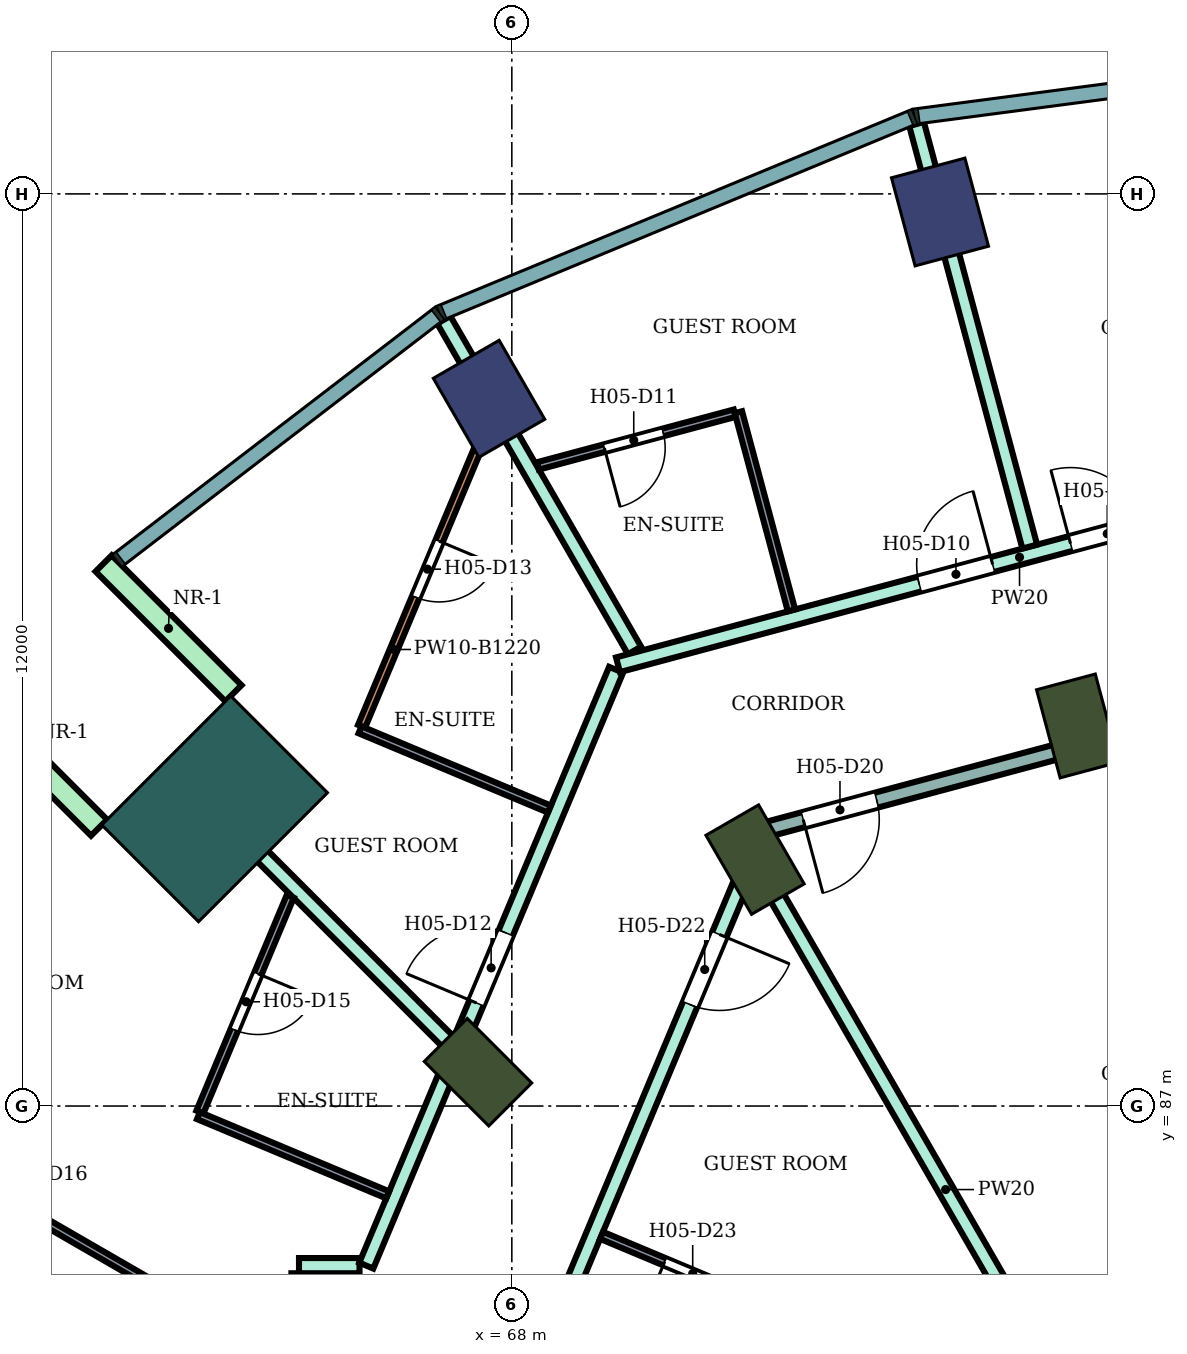
"""IFC4 building model, lengths in metres.
Left out: names, types, materials, properties, quantities, classifications, styles, units other than length and angle.
Written with IfcOpenShell. Run it as: python <this file> out.ifc"""

import sys

from ifc_helpers import new_model, si_unit, direction, frame, frame_2d, origin, origin_2d, place, context, subcontext, project, spatial, rectangle, extrude, element, fill, save


model = new_model("IFC4")
c1 = context("Model", 3, precision=1e-05, world=origin(), true_north=direction((0.0, 1.0)))
c2 = subcontext(c1, "Body", "Model", "MODEL_VIEW")
j1 = project(units=[si_unit("LENGTHUNIT", "METRE"), si_unit("PLANEANGLEUNIT", "RADIAN")], contexts=[c1])
p1 = place(None, origin())
s1 = spatial("IfcSite", under=j1, at=p1, CompositionType="ELEMENT")
p2 = place(p1, origin())
s2 = spatial("IfcBuilding", under=s1, at=p2, CompositionType="ELEMENT")
p3 = place(p2, frame((0.0, 0.0, 82.4)))
s3 = spatial("IfcBuildingStorey", under=s2, at=p3, CompositionType="ELEMENT", Elevation=82.4)
for number, where, z_axis, x_axis in (
    (1, (73.633, 98.762, 0.0), (0.0, 0.0, 1.0), (-0.259, 0.966, 0.0)),
    (2, (67.7, 96.304, 0.0), (0.0, 0.0, 1.0), (-0.5, 0.866, 0.0)),
):
    element("IfcColumn", number, at=place(p3, frame(where, z_axis=z_axis, x_axis=x_axis)), inside=s3, PredefinedType="COLUMN", context=c2, shape_type="SweptSolid", body=[
        extrude(rectangle(XDim=1.2, YDim=1.0, at=origin_2d()), origin(), (0.0, 0.0, 1.0), 3.8),
    ])
for number, where, z_axis, x_axis in (
    (3, (75.445, 92.0, 0.0), (0.0, 0.0, 1.0), (-0.259, 0.966, 0.0)),
    (4, (71.2, 90.242, 0.0), (0.0, 0.0, 1.0), (-0.5, 0.866, 0.0)),
    (5, (67.555, 87.445, 0.0), (0.0, 0.0, 1.0), (-0.707, 0.707, 0.0)),
):
    element("IfcColumn", number, at=place(p3, frame(where, z_axis=z_axis, x_axis=x_axis)), inside=s3, PredefinedType="COLUMN", context=c2, shape_type="SweptSolid", body=[
        extrude(rectangle(XDim=1.2, YDim=0.8, at=origin_2d()), origin(), (0.0, 0.0, 1.0), 3.8),
    ])
p4 = place(p3, frame((64.09, 90.91, 0.0), z_axis=(0.0, 0.0, 1.0), x_axis=(-0.707106781187, 0.707106781187, 0.0)))
e6 = element("IfcColumn", 6, at=p4, inside=s3, PredefinedType="COLUMN", context=c2, shape_type="SweptSolid", body=[
    extrude(rectangle(XDim=1.8, YDim=2.4, at=origin_2d()), origin(), (0.0, 0.0, 1.0), 3.8),
])
for number, where, z_axis, x_axis in (
    (7, (64.338, 92.43, 0.0), (0.0, 0.0, 1.0), (-0.707, 0.707, 0.0)),
    (8, (62.57, 90.662, 0.0), (0.0, 0.0, 1.0), (-0.707, 0.707, 0.0)),
):
    element("IfcWall", number, at=place(p3, frame(where, z_axis=z_axis, x_axis=x_axis)), inside=s3, PredefinedType="NOTDEFINED", context=c2, shape_type="SweptSolid", body=[
        extrude(rectangle(XDim=2.416, YDim=0.3, at=frame_2d((1.208, 0.0))), origin(), (0.0, 0.0, 1.0), 3.8),
    ])
p5 = place(p3, frame((63.6, 91.409, 0.0), z_axis=(0.0, 0.0, 1.0), x_axis=(0.70693749829, -0.707276023566, 0.0)))
e9 = element("IfcWall", 9, at=p5, inside=s3, PredefinedType="PARTITIONING", context=c2, shape_type="SweptSolid", body=[
    extrude(rectangle(XDim=5.048, YDim=0.2, at=frame_2d((2.524, 0.0))), origin(), (0.0, 0.0, 1.0), 3.35),
])
p6 = place(p3, frame((65.2, 83.65, 0.0), z_axis=(0.0, 0.0, 1.0), x_axis=(0.0, 1.0, 0.0)))
e10 = element("IfcWall", 10, at=p6, inside=s3, PredefinedType="PARTITIONING", context=c2, shape_type="SweptSolid", body=[
    extrude(rectangle(XDim=1.15, YDim=0.2, at=frame_2d((0.575, 0.0))), origin(), (0.0, 0.0, 1.0), 3.35),
])
p7 = place(p6, frame((0.062, 0.0, 0.0)))
e11 = element("IfcOpeningElement", 11, at=p7, cuts=e10, PredefinedType="OPENING", context=c2, shape_type="SweptSolid", body=[
    extrude(rectangle(XDim=1.0, YDim=2.1, at=frame_2d((0.5, 1.05))), frame((0.0, 0.11, 0.0), z_axis=(0.0, -1.0, 0.0), x_axis=(1.0, 0.0, 0.0)), (0.0, 0.0, 1.0), 0.22),
])
p8 = place(p3, frame((65.2, 84.9, 0.0), z_axis=(0.0, 0.0, 1.0), x_axis=(1.0, 0.0, 0.0)))
e12 = element("IfcWall", 12, at=p8, inside=s3, PredefinedType="PARTITIONING", context=c2, shape_type="SweptSolid", body=[
    extrude(rectangle(XDim=0.796, YDim=0.2, at=frame_2d((0.398, 0.0))), origin(), (0.0, 0.0, 1.0), 3.35),
])
p9 = place(p3, frame((66.085, 84.9, 0.0), z_axis=(0.0, 0.0, 1.0), x_axis=(0.386676248006, 0.922215527536, 0.0)))
e13 = element("IfcWall", 13, at=p9, inside=s3, PredefinedType="PARTITIONING", context=c2, shape_type="SweptSolid", body=[
    extrude(rectangle(XDim=8.5, YDim=0.2, at=frame_2d((4.25, 0.0))), origin(), (0.0, 0.0, 1.0), 3.35),
])
p10 = place(p9, frame((3.748, 0.0, 0.0)))
e14 = element("IfcOpeningElement", 14, at=p10, cuts=e13, PredefinedType="OPENING", context=c2, shape_type="SweptSolid", body=[
    extrude(rectangle(XDim=1.0, YDim=2.1, at=frame_2d((0.5, 1.05))), frame((0.0, 0.11, 0.0), z_axis=(0.0, -1.0, 0.0), x_axis=(1.0, 0.0, 0.0)), (0.0, 0.0, 1.0), 0.22),
])
p11 = place(p3, frame((67.104, 97.343, 0.0), z_axis=(0.0, 0.0, 1.0), x_axis=(0.499799615385, -0.866141064989, 0.0)))
e15 = element("IfcWall", 15, at=p11, inside=s3, PredefinedType="PARTITIONING", context=c2, shape_type="SweptSolid", body=[
    extrude(rectangle(XDim=5.021, YDim=0.2, at=frame_2d((2.511, 0.0))), origin(), (0.0, 0.0, 1.0), 3.35),
])
p12 = place(p3, frame((68.277, 83.4, 0.0), z_axis=(0.0, 0.0, 1.0), x_axis=(0.386454861164, 0.922308321703, 0.0)))
e16 = element("IfcWall", 16, at=p12, inside=s3, PredefinedType="PARTITIONING", context=c2, shape_type="SweptSolid", body=[
    extrude(rectangle(XDim=7.762, YDim=0.2, at=frame_2d((3.881, 0.0))), origin(), (0.0, 0.0, 1.0), 3.35),
])
p13 = place(p12, frame((5.351, 0.0, 0.0)))
e17 = element("IfcOpeningElement", 17, at=p13, cuts=e16, PredefinedType="OPENING", context=c2, shape_type="SweptSolid", body=[
    extrude(rectangle(XDim=1.0, YDim=2.1, at=frame_2d((0.5, 1.05))), frame((0.0, 0.11, 0.0), z_axis=(0.0, -1.0, 0.0), x_axis=(1.0, 0.0, 0.0)), (0.0, 0.0, 1.0), 0.22),
])
p14 = place(p3, frame((69.397, 92.805, 0.0), z_axis=(0.0, 0.0, 1.0), x_axis=(0.96596468683, 0.258673972015, 0.0)))
e18 = element("IfcWall", 18, at=p14, inside=s3, PredefinedType="PARTITIONING", context=c2, shape_type="SweptSolid", body=[
    extrude(rectangle(XDim=10.937, YDim=0.2, at=frame_2d((5.469, 0.0))), origin(), (0.0, 0.0, 1.0), 3.35),
])
p15 = place(p14, frame((6.163, 0.0, 0.0)))
e19 = element("IfcOpeningElement", 19, at=p15, cuts=e18, PredefinedType="OPENING", context=c2, shape_type="SweptSolid", body=[
    extrude(rectangle(XDim=1.0, YDim=2.1, at=frame_2d((0.5, 1.05))), frame((0.0, 0.11, 0.0), z_axis=(0.0, -1.0, 0.0), x_axis=(1.0, 0.0, 0.0)), (0.0, 0.0, 1.0), 0.22),
])
p16 = place(p14, frame((4.103, 0.0, 0.0)))
e20 = element("IfcOpeningElement", 20, at=p16, cuts=e18, PredefinedType="OPENING", context=c2, shape_type="SweptSolid", body=[
    extrude(rectangle(XDim=1.0, YDim=2.1, at=frame_2d((0.5, 1.05))), frame((0.0, 0.11, 0.0), z_axis=(0.0, -1.0, 0.0), x_axis=(1.0, 0.0, 0.0)), (0.0, 0.0, 1.0), 0.22),
])
p17 = place(p3, frame((71.264, 90.135, 0.0), z_axis=(0.0, 0.0, 1.0), x_axis=(0.499791624077, -0.866145676259, 0.0)))
e21 = element("IfcWall", 21, at=p17, inside=s3, PredefinedType="PARTITIONING", context=c2, shape_type="SweptSolid", body=[
    extrude(rectangle(XDim=9.778, YDim=0.2, at=frame_2d((4.889, 0.0))), origin(), (0.0, 0.0, 1.0), 3.35),
])
p18 = place(p3, frame((71.303, 90.625, 0.0), z_axis=(0.0, 0.0, 1.0), x_axis=(0.965971868307, 0.258647152776, 0.0)))
e22 = element("IfcWall", 22, at=p18, inside=s3, PredefinedType="PARTITIONING", context=c2, shape_type="SweptSolid", body=[
    extrude(rectangle(XDim=8.874, YDim=0.2, at=frame_2d((4.437, 0.0))), origin(), (0.0, 0.0, 1.0), 2.98),
])
p19 = place(p18, frame((0.55, 0.0, 0.0)))
e23 = element("IfcOpeningElement", 23, at=p19, cuts=e22, PredefinedType="OPENING", context=c2, shape_type="SweptSolid", body=[
    extrude(rectangle(XDim=1.0, YDim=2.1, at=frame_2d((0.5, 1.05))), frame((0.0, 0.11, 0.0), z_axis=(0.0, -1.0, 0.0), x_axis=(1.0, 0.0, 0.0)), (0.0, 0.0, 1.0), 0.22),
])
p20 = place(p3, frame((73.325, 99.919, 0.0), z_axis=(0.0, 0.0, 1.0), x_axis=(0.25871346471, -0.965954110286, 0.0)))
e24 = element("IfcWall", 24, at=p20, inside=s3, PredefinedType="PARTITIONING", context=c2, shape_type="SweptSolid", body=[
    extrude(rectangle(XDim=5.754, YDim=0.2, at=frame_2d((2.877, 0.0))), origin(), (0.0, 0.0, 1.0), 3.35),
])
p21 = place(p3, frame((57.659, 87.899, 0.0), z_axis=(0.0, 0.0, 1.0), x_axis=(0.86602264145, -0.500004784474, 0.0)))
e25 = element("IfcWall", 25, at=p21, inside=s3, PredefinedType="PARTITIONING", context=c2, shape_type="SweptSolid", body=[
    extrude(rectangle(XDim=8.708, YDim=0.1, at=frame_2d((4.354, 0.0))), origin(), (0.0, 0.0, 1.0), 3.35),
])
p22 = place(p21, frame((3.929, 0.0, 0.0)))
e26 = element("IfcOpeningElement", 26, at=p22, cuts=e25, PredefinedType="OPENING", context=c2, shape_type="SweptSolid", body=[
    extrude(rectangle(XDim=0.9, YDim=2.1, at=frame_2d((0.45, 1.05))), frame((0.0, 0.06, 0.0), z_axis=(0.0, -1.0, 0.0), x_axis=(1.0, 0.0, 0.0)), (0.0, 0.0, 1.0), 0.12),
])
p23 = place(p3, frame((63.896, 86.92, 0.0), z_axis=(0.0, 0.0, 1.0), x_axis=(0.386485049699, 0.922295671875, 0.0)))
e27 = element("IfcWall", 27, at=p23, inside=s3, PredefinedType="PARTITIONING", context=c2, shape_type="SweptSolid", body=[
    extrude(rectangle(XDim=3.077, YDim=0.1, at=frame_2d((1.539, 0.0))), origin(), (0.0, 0.0, 1.0), 3.35),
])
p24 = place(p23, frame((1.174, 0.0, 0.0)))
e28 = element("IfcOpeningElement", 28, at=p24, cuts=e27, PredefinedType="OPENING", context=c2, shape_type="SweptSolid", body=[
    extrude(rectangle(XDim=0.8, YDim=2.1, at=frame_2d((0.4, 1.05))), frame((0.0, 0.06, 0.0), z_axis=(0.0, -1.0, 0.0), x_axis=(1.0, 0.0, 0.0)), (0.0, 0.0, 1.0), 0.12),
])
p25 = place(p3, frame((63.877, 86.874, 0.0), z_axis=(0.0, 0.0, 1.0), x_axis=(0.922350337209, -0.386354572188, 0.0)))
e29 = element("IfcWall", 29, at=p25, inside=s3, PredefinedType="PARTITIONING", context=c2, shape_type="SweptSolid", body=[
    extrude(rectangle(XDim=2.7, YDim=0.1, at=frame_2d((1.35, 0.0))), origin(), (0.0, 0.0, 1.0), 3.35),
])
p26 = place(p3, frame((66.023, 91.996, 0.0), z_axis=(0.0, 0.0, 1.0), x_axis=(0.386497426192, 0.922290485447, 0.0)))
e30 = element("IfcWall", 30, at=p26, inside=s3, PredefinedType="PARTITIONING", context=c2, shape_type="SweptSolid", body=[
    extrude(rectangle(XDim=4.383, YDim=0.1, at=frame_2d((2.191, 0.0))), origin(), (0.0, 0.0, 1.0), 2.58),
])
p27 = place(p26, frame((1.841, 0.0, 0.0)))
e31 = element("IfcOpeningElement", 31, at=p27, cuts=e30, PredefinedType="OPENING", context=c2, shape_type="SweptSolid", body=[
    extrude(rectangle(XDim=0.8, YDim=2.1, at=frame_2d((0.4, 1.05))), frame((0.0, 0.06, 0.0), z_axis=(0.0, -1.0, 0.0), x_axis=(1.0, 0.0, 0.0)), (0.0, 0.0, 1.0), 0.12),
])
p28 = place(p3, frame((66.003, 91.95, 0.0), z_axis=(0.0, 0.0, 1.0), x_axis=(0.922350337209, -0.386354572188, 0.0)))
e32 = element("IfcWall", 32, at=p28, inside=s3, PredefinedType="PARTITIONING", context=c2, shape_type="SweptSolid", body=[
    extrude(rectangle(XDim=2.7, YDim=0.1, at=frame_2d((1.35, 0.0))), origin(), (0.0, 0.0, 1.0), 3.35),
])
p29 = place(p3, frame((68.343, 95.421, 0.0), z_axis=(0.0, 0.0, 1.0), x_axis=(0.965922846648, 0.258830165017, 0.0)))
e33 = element("IfcWall", 33, at=p29, inside=s3, PredefinedType="PARTITIONING", context=c2, shape_type="SweptSolid", body=[
    extrude(rectangle(XDim=2.681, YDim=0.1, at=frame_2d((1.34, 0.0))), origin(), (0.0, 0.0, 1.0), 3.35),
])
p30 = place(p29, frame((0.905, 0.0, 0.0)))
e34 = element("IfcOpeningElement", 34, at=p30, cuts=e33, PredefinedType="OPENING", context=c2, shape_type="SweptSolid", body=[
    extrude(rectangle(XDim=0.8, YDim=2.1, at=frame_2d((0.4, 1.05))), frame((0.0, 0.06, 0.0), z_axis=(0.0, -1.0, 0.0), x_axis=(1.0, 0.0, 0.0)), (0.0, 0.0, 1.0), 0.12),
])
p31 = place(p3, frame((69.181, 85.298, 0.0), z_axis=(0.0, 0.0, 1.0), x_axis=(0.922377635784, -0.38628939541, 0.0)))
e35 = element("IfcWall", 35, at=p31, inside=s3, PredefinedType="PARTITIONING", context=c2, shape_type="SweptSolid", body=[
    extrude(rectangle(XDim=2.65, YDim=0.1, at=frame_2d((1.325, 0.0))), origin(), (0.0, 0.0, 1.0), 3.35),
])
p32 = place(p31, frame((0.9, 0.0, 0.0)))
e36 = element("IfcOpeningElement", 36, at=p32, cuts=e35, PredefinedType="OPENING", context=c2, shape_type="SweptSolid", body=[
    extrude(rectangle(XDim=0.8, YDim=2.1, at=frame_2d((0.4, 1.05))), frame((0.0, 0.06, 0.0), z_axis=(0.0, -1.0, 0.0), x_axis=(1.0, 0.0, 0.0)), (0.0, 0.0, 1.0), 0.12),
])
p33 = place(p3, frame((70.981, 96.128, 0.0), z_axis=(0.0, 0.0, 1.0), x_axis=(0.25867580527, -0.965964195904, 0.0)))
e37 = element("IfcWall", 37, at=p33, inside=s3, PredefinedType="PARTITIONING", context=c2, shape_type="SweptSolid", body=[
    extrude(rectangle(XDim=2.699, YDim=0.1, at=frame_2d((1.35, 0.0))), origin(), (0.0, 0.0, 1.0), 3.35),
])
p34 = place(p15, origin())
e38 = element("IfcDoor", 38, at=p34, inside=s3, OperationType="SINGLE_SWING_LEFT", PredefinedType="DOOR", context=c2, shape_type="SweptSolid", body=[
    extrude(rectangle(XDim=1.0, YDim=2.1, at=frame_2d((0.5, 1.05))), frame((0.0, 0.025, 0.0), z_axis=(0.0, -1.0, 0.0), x_axis=(1.0, 0.0, 0.0)), (0.0, 0.0, 1.0), 0.05),
])
fill(e19, e38)
p35 = place(p16, origin())
e39 = element("IfcDoor", 39, at=p35, inside=s3, OperationType="SINGLE_SWING_RIGHT", PredefinedType="DOOR", context=c2, shape_type="SweptSolid", body=[
    extrude(rectangle(XDim=1.0, YDim=2.1, at=frame_2d((0.5, 1.05))), frame((0.0, 0.025, 0.0), z_axis=(0.0, -1.0, 0.0), x_axis=(1.0, 0.0, 0.0)), (0.0, 0.0, 1.0), 0.05),
])
fill(e20, e39)
p36 = place(p30, frame((0.8, 0.0, 0.0), z_axis=(0.0, 0.0, 1.0), x_axis=(-1.0, 0.0, 0.0)))
e40 = element("IfcDoor", 40, at=p36, inside=s3, OperationType="SINGLE_SWING_RIGHT", PredefinedType="DOOR", context=c2, shape_type="SweptSolid", body=[
    extrude(rectangle(XDim=0.8, YDim=2.1, at=frame_2d((0.4, 1.05))), frame((0.0, 0.025, 0.0), z_axis=(0.0, -1.0, 0.0), x_axis=(1.0, 0.0, 0.0)), (0.0, 0.0, 1.0), 0.05),
])
fill(e34, e40)
p37 = place(p10, origin())
e41 = element("IfcDoor", 41, at=p37, inside=s3, OperationType="SINGLE_SWING_LEFT", PredefinedType="DOOR", context=c2, shape_type="SweptSolid", body=[
    extrude(rectangle(XDim=1.0, YDim=2.1, at=frame_2d((0.5, 1.05))), frame((0.0, 0.025, 0.0), z_axis=(0.0, -1.0, 0.0), x_axis=(1.0, 0.0, 0.0)), (0.0, 0.0, 1.0), 0.05),
])
fill(e14, e41)
p38 = place(p27, frame((0.8, 0.0, 0.0), z_axis=(0.0, 0.0, 1.0), x_axis=(-1.0, 0.0, 0.0)))
e42 = element("IfcDoor", 42, at=p38, inside=s3, OperationType="SINGLE_SWING_LEFT", PredefinedType="DOOR", context=c2, shape_type="SweptSolid", body=[
    extrude(rectangle(XDim=0.8, YDim=2.1, at=frame_2d((0.4, 1.05))), frame((0.0, 0.025, 0.0), z_axis=(0.0, -1.0, 0.0), x_axis=(1.0, 0.0, 0.0)), (0.0, 0.0, 1.0), 0.05),
])
fill(e31, e42)
p39 = place(p24, frame((0.8, 0.0, 0.0), z_axis=(0.0, 0.0, 1.0), x_axis=(-1.0, 0.0, 0.0)))
e43 = element("IfcDoor", 43, at=p39, inside=s3, OperationType="SINGLE_SWING_LEFT", PredefinedType="DOOR", context=c2, shape_type="SweptSolid", body=[
    extrude(rectangle(XDim=0.8, YDim=2.1, at=frame_2d((0.4, 1.05))), frame((0.0, 0.025, 0.0), z_axis=(0.0, -1.0, 0.0), x_axis=(1.0, 0.0, 0.0)), (0.0, 0.0, 1.0), 0.05),
])
fill(e28, e43)
p40 = place(p19, frame((1.0, 0.0, 0.0), z_axis=(0.0, 0.0, 1.0), x_axis=(-1.0, 0.0, 0.0)))
e44 = element("IfcDoor", 44, at=p40, inside=s3, OperationType="SINGLE_SWING_RIGHT", PredefinedType="DOOR", context=c2, shape_type="SweptSolid", body=[
    extrude(rectangle(XDim=1.0, YDim=2.1, at=frame_2d((0.5, 1.05))), frame((0.0, 0.025, 0.0), z_axis=(0.0, -1.0, 0.0), x_axis=(1.0, 0.0, 0.0)), (0.0, 0.0, 1.0), 0.05),
])
fill(e23, e44)
p41 = place(p13, frame((1.0, 0.0, 0.0), z_axis=(0.0, 0.0, 1.0), x_axis=(-1.0, 0.0, 0.0)))
e45 = element("IfcDoor", 45, at=p41, inside=s3, OperationType="SINGLE_SWING_LEFT", PredefinedType="DOOR", context=c2, shape_type="SweptSolid", body=[
    extrude(rectangle(XDim=1.0, YDim=2.1, at=frame_2d((0.5, 1.05))), frame((0.0, 0.025, 0.0), z_axis=(0.0, -1.0, 0.0), x_axis=(1.0, 0.0, 0.0)), (0.0, 0.0, 1.0), 0.05),
])
fill(e17, e45)
p42 = place(p32, frame((0.8, 0.0, 0.0), z_axis=(0.0, 0.0, 1.0), x_axis=(-1.0, 0.0, 0.0)))
e46 = element("IfcDoor", 46, at=p42, inside=s3, OperationType="SINGLE_SWING_RIGHT", PredefinedType="DOOR", context=c2, shape_type="SweptSolid", body=[
    extrude(rectangle(XDim=0.8, YDim=2.1, at=frame_2d((0.4, 1.05))), frame((0.0, 0.025, 0.0), z_axis=(0.0, -1.0, 0.0), x_axis=(1.0, 0.0, 0.0)), (0.0, 0.0, 1.0), 0.05),
])
fill(e36, e46)
save(model, sys.argv[1])
